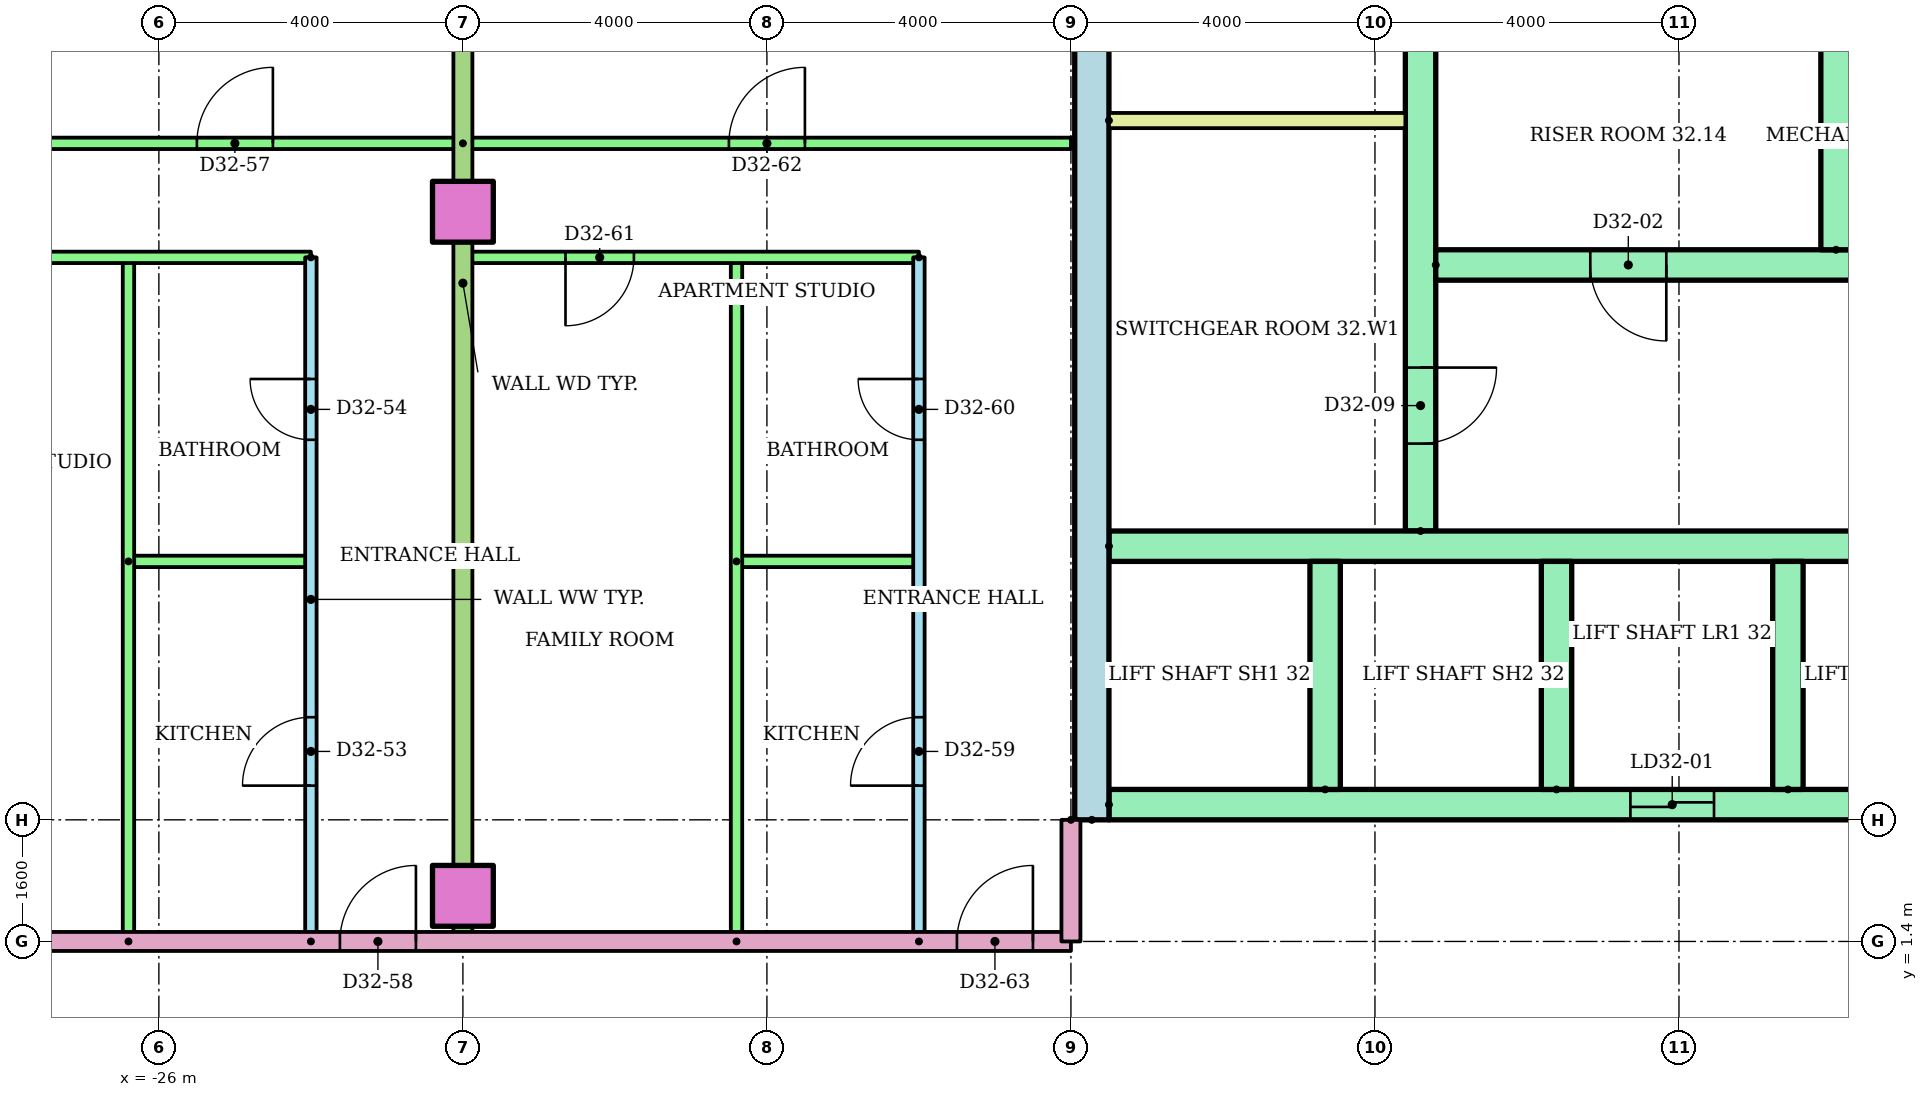
"""IFC4 building model, lengths in metres.
Left out: names, types, materials, properties, quantities, classifications, styles, units other than length and angle.
Written with IfcOpenShell. Run it as: python <this file> out.ifc"""

import sys

from ifc_helpers import new_model, si_unit, direction, frame, frame_2d, origin, origin_2d, place, context, subcontext, project, spatial, rectangle, extrude, element, fill, save


model = new_model("IFC4")
c1 = context("Model", 3, precision=1e-05, world=origin(), true_north=direction((0.0, 1.0)))
c2 = subcontext(c1, "Body", "Model", "MODEL_VIEW")
j1 = project(units=[si_unit("LENGTHUNIT", "METRE"), si_unit("PLANEANGLEUNIT", "RADIAN")], contexts=[c1])
p1 = place(None, origin())
s1 = spatial("IfcSite", under=j1, at=p1, CompositionType="ELEMENT")
p2 = place(p1, origin())
s2 = spatial("IfcBuilding", under=s1, at=p2, CompositionType="ELEMENT")
p3 = place(p2, frame((0.0, 0.0, 126.2)))
s3 = spatial("IfcBuildingStorey", under=s2, at=p3, CompositionType="ELEMENT", Elevation=126.2)
for number, where in (
    (1, (-22.0, 2.0, 0.0)),
    (2, (-22.0, 11.0, 0.0)),
):
    element("IfcColumn", number, at=place(p3, frame(where)), inside=s3, PredefinedType="COLUMN", context=c2, shape_type="SweptSolid", body=[
        extrude(rectangle(XDim=0.8, YDim=0.8, at=origin_2d()), origin(), (0.0, 0.0, 1.0), 3.2),
    ])
p4 = place(p3, frame((-13.725, 3.0, 0.0), z_axis=(0.0, 0.0, 1.0), x_axis=(0.0, 1.0, 0.0)))
e3 = element("IfcWall", 3, at=p4, inside=s3, PredefinedType="SHEAR", context=c2, shape_type="SweptSolid", body=[
    extrude(rectangle(XDim=17.0, YDim=0.45, at=frame_2d((8.5, 0.0))), origin(), (0.0, 0.0, 1.0), 2.92),
])
p5 = place(p3, frame((-9.4, 6.8, 0.0), z_axis=(0.0, 0.0, 1.0), x_axis=(0.0, 1.0, 0.0)))
e4 = element("IfcWall", 4, at=p5, inside=s3, PredefinedType="SHEAR", context=c2, shape_type="SweptSolid", body=[
    extrude(rectangle(XDim=12.7, YDim=0.4, at=frame_2d((6.35, 0.0))), origin(), (0.0, 0.0, 1.0), 2.92),
])
p6 = place(p5, frame((1.15, 0.0, 0.0)))
e5 = element("IfcOpeningElement", 5, at=p6, cuts=e4, PredefinedType="OPENING", context=c2, shape_type="SweptSolid", body=[
    extrude(rectangle(XDim=1.0, YDim=2.1, at=frame_2d((0.5, 1.05))), frame((0.0, 0.21, 0.0), z_axis=(0.0, -1.0, 0.0), x_axis=(1.0, 0.0, 0.0)), (0.0, 0.0, 1.0), 0.42),
])
p7 = place(p5, frame((7.925, 0.0, 0.0)))
e6 = element("IfcOpeningElement", 6, at=p7, cuts=e4, PredefinedType="OPENING", context=c2, shape_type="SweptSolid", body=[
    extrude(rectangle(XDim=1.0, YDim=2.1, at=frame_2d((0.5, 1.05))), frame((0.0, 0.21, 0.0), z_axis=(0.0, -1.0, 0.0), x_axis=(1.0, 0.0, 0.0)), (0.0, 0.0, 1.0), 0.42),
])
p8 = place(p3, frame((-13.5, 3.2, 0.0)))
e7 = element("IfcWall", 7, at=p8, inside=s3, PredefinedType="SHEAR", context=c2, shape_type="SweptSolid", body=[
    extrude(rectangle(XDim=27.0, YDim=0.4, at=frame_2d((13.5, 0.0))), origin(), (0.0, 0.0, 1.0), 2.92),
])
p9 = place(p8, frame((6.861, 0.0, 0.0)))
e8 = element("IfcOpeningElement", 8, at=p9, cuts=e7, PredefinedType="OPENING", context=c2, shape_type="SweptSolid", body=[
    extrude(rectangle(XDim=1.1, YDim=2.1, at=frame_2d((0.55, 1.05))), frame((0.0, 0.21, 0.0), z_axis=(0.0, -1.0, 0.0), x_axis=(1.0, 0.0, 0.0)), (0.0, 0.0, 1.0), 0.42),
])
p10 = place(p8, frame((9.906, 0.0, 0.0)))
e9 = element("IfcOpeningElement", 9, at=p10, cuts=e7, PredefinedType="OPENING", context=c2, shape_type="SweptSolid", body=[
    extrude(rectangle(XDim=1.1, YDim=2.1, at=frame_2d((0.55, 1.05))), frame((0.0, 0.21, 0.0), z_axis=(0.0, -1.0, 0.0), x_axis=(1.0, 0.0, 0.0)), (0.0, 0.0, 1.0), 0.42),
])
p11 = place(p8, frame((15.994, 0.0, 0.0)))
e10 = element("IfcOpeningElement", 10, at=p11, cuts=e7, PredefinedType="OPENING", context=c2, shape_type="SweptSolid", body=[
    extrude(rectangle(XDim=1.1, YDim=2.1, at=frame_2d((0.55, 1.05))), frame((0.0, 0.21, 0.0), z_axis=(0.0, -1.0, 0.0), x_axis=(1.0, 0.0, 0.0)), (0.0, 0.0, 1.0), 0.42),
])
p12 = place(p8, frame((19.039, 0.0, 0.0)))
e11 = element("IfcOpeningElement", 11, at=p12, cuts=e7, PredefinedType="OPENING", context=c2, shape_type="SweptSolid", body=[
    extrude(rectangle(XDim=1.1, YDim=2.1, at=frame_2d((0.55, 1.05))), frame((0.0, 0.21, 0.0), z_axis=(0.0, -1.0, 0.0), x_axis=(1.0, 0.0, 0.0)), (0.0, 0.0, 1.0), 0.42),
])
p13 = place(p8, frame((12.6, 0.0, 0.0)))
e12 = element("IfcOpeningElement", 12, at=p13, cuts=e7, PredefinedType="OPENING", context=c2, shape_type="SweptSolid", body=[
    extrude(rectangle(XDim=1.8, YDim=2.1, at=frame_2d((0.9, 1.05))), frame((0.0, 0.21, 0.0), z_axis=(0.0, -1.0, 0.0), x_axis=(1.0, 0.0, 0.0)), (0.0, 0.0, 1.0), 0.42),
])
p14 = place(p3, frame((-13.5, 6.6, 0.0)))
e13 = element("IfcWall", 13, at=p14, inside=s3, PredefinedType="SHEAR", context=c2, shape_type="SweptSolid", body=[
    extrude(rectangle(XDim=11.978, YDim=0.4, at=frame_2d((5.989, 0.0))), origin(), (0.0, 0.0, 1.0), 2.92),
])
for number, where, z_axis, x_axis in (
    (14, (-10.656, 3.4, 0.0), (0.0, 0.0, 1.0), (0.0, 1.0, 0.0)),
    (15, (-7.611, 3.4, 0.0), (0.0, 0.0, 1.0), (0.0, 1.0, 0.0)),
    (16, (-4.567, 3.4, 0.0), (0.0, 0.0, 1.0), (0.0, 1.0, 0.0)),
):
    element("IfcWall", number, at=place(p3, frame(where, z_axis=z_axis, x_axis=x_axis)), inside=s3, PredefinedType="SHEAR", context=c2, shape_type="SweptSolid", body=[
        extrude(rectangle(XDim=3.0, YDim=0.4, at=frame_2d((1.5, 0.0))), origin(), (0.0, 0.0, 1.0), 2.92),
    ])
p15 = place(p3, frame((-9.2, 10.3, 0.0)))
e17 = element("IfcWall", 17, at=p15, inside=s3, PredefinedType="SHEAR", context=c2, shape_type="SweptSolid", body=[
    extrude(rectangle(XDim=8.0, YDim=0.4, at=frame_2d((4.0, 0.0))), origin(), (0.0, 0.0, 1.0), 2.92),
])
p16 = place(p15, frame((2.033, 0.0, 0.0)))
e18 = element("IfcOpeningElement", 18, at=p16, cuts=e17, PredefinedType="OPENING", context=c2, shape_type="SweptSolid", body=[
    extrude(rectangle(XDim=1.0, YDim=2.1, at=frame_2d((0.5, 1.05))), frame((0.0, 0.21, 0.0), z_axis=(0.0, -1.0, 0.0), x_axis=(1.0, 0.0, 0.0)), (0.0, 0.0, 1.0), 0.42),
])
p17 = place(p15, frame((6.133, 0.0, 0.0)))
e19 = element("IfcOpeningElement", 19, at=p17, cuts=e17, PredefinedType="OPENING", context=c2, shape_type="SweptSolid", body=[
    extrude(rectangle(XDim=1.0, YDim=2.1, at=frame_2d((0.5, 1.05))), frame((0.0, 0.21, 0.0), z_axis=(0.0, -1.0, 0.0), x_axis=(1.0, 0.0, 0.0)), (0.0, 0.0, 1.0), 0.42),
])
p18 = place(p3, frame((-3.933, 10.5, 0.0), z_axis=(0.0, 0.0, 1.0), x_axis=(0.0, 1.0, 0.0)))
e20 = element("IfcWall", 20, at=p18, inside=s3, PredefinedType="SHEAR", context=c2, shape_type="SweptSolid", body=[
    extrude(rectangle(XDim=3.0, YDim=0.4, at=frame_2d((1.5, 0.0))), origin(), (0.0, 0.0, 1.0), 2.92),
])
p19 = place(p3, frame((-13.5, 12.2, 0.0)))
e21 = element("IfcWall", 21, at=p19, inside=s3, PredefinedType="PARTITIONING", context=c2, shape_type="SweptSolid", body=[
    extrude(rectangle(XDim=3.9, YDim=0.2, at=frame_2d((1.95, 0.0))), origin(), (0.0, 0.0, 1.0), 2.92),
])
p20 = place(p3, frame((-24.0, 1.4, 0.0), z_axis=(0.0, 0.0, 1.0), x_axis=(0.0, 1.0, 0.0)))
e22 = element("IfcWall", 22, at=p20, inside=s3, PredefinedType="PARTITIONING", context=c2, shape_type="SweptSolid", body=[
    extrude(rectangle(XDim=9.0, YDim=0.15, at=frame_2d((4.5, 0.0))), origin(), (0.0, 0.0, 1.0), 2.4),
])
p21 = place(p20, frame((2.05, 0.0, 0.0)))
e23 = element("IfcOpeningElement", 23, at=p21, cuts=e22, PredefinedType="OPENING", context=c2, shape_type="SweptSolid", body=[
    extrude(rectangle(XDim=0.9, YDim=2.1, at=frame_2d((0.45, 1.05))), frame((0.0, 0.085, 0.0), z_axis=(0.0, -1.0, 0.0), x_axis=(1.0, 0.0, 0.0)), (0.0, 0.0, 1.0), 0.17),
])
p22 = place(p20, frame((6.6, 0.0, 0.0)))
e24 = element("IfcOpeningElement", 24, at=p22, cuts=e22, PredefinedType="OPENING", context=c2, shape_type="SweptSolid", body=[
    extrude(rectangle(XDim=0.8, YDim=2.1, at=frame_2d((0.4, 1.05))), frame((0.0, 0.085, 0.0), z_axis=(0.0, -1.0, 0.0), x_axis=(1.0, 0.0, 0.0)), (0.0, 0.0, 1.0), 0.17),
])
p23 = place(p3, frame((-26.4, 6.4, 0.0)))
e25 = element("IfcWall", 25, at=p23, inside=s3, PredefinedType="PARTITIONING", context=c2, shape_type="SweptSolid", body=[
    extrude(rectangle(XDim=2.4, YDim=0.15, at=frame_2d((1.2, 0.0))), origin(), (0.0, 0.0, 1.0), 2.4),
])
p24 = place(p3, frame((-26.4, 1.4, 0.0), z_axis=(0.0, 0.0, 1.0), x_axis=(0.0, 1.0, 0.0)))
e26 = element("IfcWall", 26, at=p24, inside=s3, PredefinedType="PARTITIONING", context=c2, shape_type="SweptSolid", body=[
    extrude(rectangle(XDim=9.0, YDim=0.15, at=frame_2d((4.5, 0.0))), origin(), (0.0, 0.0, 1.0), 2.4),
])
p25 = place(p3, frame((-24.0, 10.4, 0.0), z_axis=(0.0, 0.0, 1.0), x_axis=(-1.0, 0.0, 0.0)))
e27 = element("IfcWall", 27, at=p25, inside=s3, PredefinedType="PARTITIONING", context=c2, shape_type="SweptSolid", body=[
    extrude(rectangle(XDim=8.72, YDim=0.15, at=frame_2d((4.36, 0.0))), origin(), (0.0, 0.0, 1.0), 2.4),
])
p26 = place(p25, frame((4.482, 0.0, 0.0)))
e28 = element("IfcOpeningElement", 28, at=p26, cuts=e27, PredefinedType="OPENING", context=c2, shape_type="SweptSolid", body=[
    extrude(rectangle(XDim=0.9, YDim=2.1, at=frame_2d((0.45, 1.05))), frame((0.0, 0.085, 0.0), z_axis=(0.0, -1.0, 0.0), x_axis=(1.0, 0.0, 0.0)), (0.0, 0.0, 1.0), 0.17),
])
p27 = place(p3, frame((-32.72, 11.9, 0.0)))
e29 = element("IfcWall", 29, at=p27, inside=s3, PredefinedType="PARTITIONING", context=c2, shape_type="SweptSolid", body=[
    extrude(rectangle(XDim=10.72, YDim=0.15, at=frame_2d((5.36, 0.0))), origin(), (0.0, 0.0, 1.0), 2.4),
])
p28 = place(p27, frame((1.102, 0.0, 0.0)))
e30 = element("IfcOpeningElement", 30, at=p28, cuts=e29, PredefinedType="OPENING", context=c2, shape_type="SweptSolid", body=[
    extrude(rectangle(XDim=1.0, YDim=2.1, at=frame_2d((0.5, 1.05))), frame((0.0, 0.085, 0.0), z_axis=(0.0, -1.0, 0.0), x_axis=(1.0, 0.0, 0.0)), (0.0, 0.0, 1.0), 0.17),
])
p29 = place(p27, frame((7.22, 0.0, 0.0)))
e31 = element("IfcOpeningElement", 31, at=p29, cuts=e29, PredefinedType="OPENING", context=c2, shape_type="SweptSolid", body=[
    extrude(rectangle(XDim=1.0, YDim=2.1, at=frame_2d((0.5, 1.05))), frame((0.0, 0.085, 0.0), z_axis=(0.0, -1.0, 0.0), x_axis=(1.0, 0.0, 0.0)), (0.0, 0.0, 1.0), 0.17),
])
p30 = place(p3, frame((-16.0, 1.4, 0.0), z_axis=(0.0, 0.0, 1.0), x_axis=(0.0, 1.0, 0.0)))
e32 = element("IfcWall", 32, at=p30, inside=s3, PredefinedType="PARTITIONING", context=c2, shape_type="SweptSolid", body=[
    extrude(rectangle(XDim=9.0, YDim=0.15, at=frame_2d((4.5, 0.0))), origin(), (0.0, 0.0, 1.0), 2.4),
])
p31 = place(p30, frame((2.05, 0.0, 0.0)))
e33 = element("IfcOpeningElement", 33, at=p31, cuts=e32, PredefinedType="OPENING", context=c2, shape_type="SweptSolid", body=[
    extrude(rectangle(XDim=0.9, YDim=2.1, at=frame_2d((0.45, 1.05))), frame((0.0, 0.085, 0.0), z_axis=(0.0, -1.0, 0.0), x_axis=(1.0, 0.0, 0.0)), (0.0, 0.0, 1.0), 0.17),
])
p32 = place(p30, frame((6.6, 0.0, 0.0)))
e34 = element("IfcOpeningElement", 34, at=p32, cuts=e32, PredefinedType="OPENING", context=c2, shape_type="SweptSolid", body=[
    extrude(rectangle(XDim=0.8, YDim=2.1, at=frame_2d((0.4, 1.05))), frame((0.0, 0.085, 0.0), z_axis=(0.0, -1.0, 0.0), x_axis=(1.0, 0.0, 0.0)), (0.0, 0.0, 1.0), 0.17),
])
p33 = place(p3, frame((-18.4, 6.4, 0.0)))
e35 = element("IfcWall", 35, at=p33, inside=s3, PredefinedType="PARTITIONING", context=c2, shape_type="SweptSolid", body=[
    extrude(rectangle(XDim=2.4, YDim=0.15, at=frame_2d((1.2, 0.0))), origin(), (0.0, 0.0, 1.0), 2.4),
])
p34 = place(p3, frame((-18.4, 1.4, 0.0), z_axis=(0.0, 0.0, 1.0), x_axis=(0.0, 1.0, 0.0)))
e36 = element("IfcWall", 36, at=p34, inside=s3, PredefinedType="PARTITIONING", context=c2, shape_type="SweptSolid", body=[
    extrude(rectangle(XDim=9.0, YDim=0.15, at=frame_2d((4.5, 0.0))), origin(), (0.0, 0.0, 1.0), 2.4),
])
p35 = place(p3, frame((-16.0, 10.4, 0.0), z_axis=(0.0, 0.0, 1.0), x_axis=(-1.0, 0.0, 0.0)))
e37 = element("IfcWall", 37, at=p35, inside=s3, PredefinedType="PARTITIONING", context=c2, shape_type="SweptSolid", body=[
    extrude(rectangle(XDim=6.0, YDim=0.15, at=frame_2d((3.0, 0.0))), origin(), (0.0, 0.0, 1.0), 2.4),
])
p36 = place(p35, frame((3.75, 0.0, 0.0)))
e38 = element("IfcOpeningElement", 38, at=p36, cuts=e37, PredefinedType="OPENING", context=c2, shape_type="SweptSolid", body=[
    extrude(rectangle(XDim=0.9, YDim=2.1, at=frame_2d((0.45, 1.05))), frame((0.0, 0.085, 0.0), z_axis=(0.0, -1.0, 0.0), x_axis=(1.0, 0.0, 0.0)), (0.0, 0.0, 1.0), 0.17),
])
p37 = place(p3, frame((-22.0, 11.9, 0.0)))
e39 = element("IfcWall", 39, at=p37, inside=s3, PredefinedType="PARTITIONING", context=c2, shape_type="SweptSolid", body=[
    extrude(rectangle(XDim=8.0, YDim=0.15, at=frame_2d((4.0, 0.0))), origin(), (0.0, 0.0, 1.0), 2.4),
])
p38 = place(p37, frame((3.5, 0.0, 0.0)))
e40 = element("IfcOpeningElement", 40, at=p38, cuts=e39, PredefinedType="OPENING", context=c2, shape_type="SweptSolid", body=[
    extrude(rectangle(XDim=1.0, YDim=2.1, at=frame_2d((0.5, 1.05))), frame((0.0, 0.085, 0.0), z_axis=(0.0, -1.0, 0.0), x_axis=(1.0, 0.0, 0.0)), (0.0, 0.0, 1.0), 0.17),
])
p39 = place(p3, frame((-22.0, 18.721, 0.0), z_axis=(0.0, 0.0, 1.0), x_axis=(0.0, -1.0, 0.0)))
e41 = element("IfcWall", 41, at=p39, inside=s3, PredefinedType="PARTITIONING", context=c2, shape_type="SweptSolid", body=[
    extrude(rectangle(XDim=17.321, YDim=0.25, at=frame_2d((8.661, 0.0))), origin(), (0.0, 0.0, 1.0), 2.4),
])
p40 = place(p3, frame((-29.0, 1.4, 0.0)))
e42 = element("IfcWall", 42, at=p40, inside=s3, PredefinedType="PARTITIONING", context=c2, shape_type="SweptSolid", body=[
    extrude(rectangle(XDim=15.0, YDim=0.25, at=frame_2d((7.5, 0.0))), origin(), (0.0, 0.0, 1.0), 2.4),
])
p41 = place(p40, frame((5.382, 0.0, 0.0)))
e43 = element("IfcOpeningElement", 43, at=p41, cuts=e42, PredefinedType="OPENING", context=c2, shape_type="SweptSolid", body=[
    extrude(rectangle(XDim=1.0, YDim=2.1, at=frame_2d((0.5, 1.05))), frame((0.0, 0.135, 0.0), z_axis=(0.0, -1.0, 0.0), x_axis=(1.0, 0.0, 0.0)), (0.0, 0.0, 1.0), 0.27),
])
p42 = place(p40, frame((13.5, 0.0, 0.0)))
e44 = element("IfcOpeningElement", 44, at=p42, cuts=e42, PredefinedType="OPENING", context=c2, shape_type="SweptSolid", body=[
    extrude(rectangle(XDim=1.0, YDim=2.1, at=frame_2d((0.5, 1.05))), frame((0.0, 0.135, 0.0), z_axis=(0.0, -1.0, 0.0), x_axis=(1.0, 0.0, 0.0)), (0.0, 0.0, 1.0), 0.27),
])
p43 = place(p3, frame((-14.0, 3.0, 0.0), z_axis=(0.0, 0.0, 1.0), x_axis=(0.0, -1.0, 0.0)))
e45 = element("IfcWall", 45, at=p43, inside=s3, PredefinedType="PARTITIONING", context=c2, shape_type="SweptSolid", body=[
    extrude(rectangle(XDim=1.6, YDim=0.25, at=frame_2d((0.8, 0.0))), origin(), (0.0, 0.0, 1.0), 2.4),
])
p44 = place(p9, origin())
e46 = element("IfcDoor", 46, at=p44, inside=s3, OperationType="SLIDING_TO_LEFT", PredefinedType="DOOR", context=c2, shape_type="SweptSolid", body=[
    extrude(rectangle(XDim=1.1, YDim=2.1, at=frame_2d((0.55, 1.05))), frame((0.0, 0.025, 0.0), z_axis=(0.0, -1.0, 0.0), x_axis=(1.0, 0.0, 0.0)), (0.0, 0.0, 1.0), 0.05),
])
fill(e8, e46)
p45 = place(p16, frame((1.0, 0.0, 0.0), z_axis=(0.0, 0.0, 1.0), x_axis=(-1.0, 0.0, 0.0)))
e47 = element("IfcDoor", 47, at=p45, inside=s3, OperationType="SINGLE_SWING_RIGHT", PredefinedType="DOOR", context=c2, shape_type="SweptSolid", body=[
    extrude(rectangle(XDim=1.0, YDim=2.1, at=frame_2d((0.5, 1.05))), frame((0.0, 0.025, 0.0), z_axis=(0.0, -1.0, 0.0), x_axis=(1.0, 0.0, 0.0)), (0.0, 0.0, 1.0), 0.05),
])
fill(e18, e47)
p46 = place(p6, frame((1.0, 0.0, 0.0), z_axis=(0.0, 0.0, 1.0), x_axis=(-1.0, 0.0, 0.0)))
e48 = element("IfcDoor", 48, at=p46, inside=s3, OperationType="SINGLE_SWING_RIGHT", PredefinedType="DOOR", context=c2, shape_type="SweptSolid", body=[
    extrude(rectangle(XDim=1.0, YDim=2.1, at=frame_2d((0.5, 1.05))), frame((0.0, 0.025, 0.0), z_axis=(0.0, -1.0, 0.0), x_axis=(1.0, 0.0, 0.0)), (0.0, 0.0, 1.0), 0.05),
])
fill(e5, e48)
p47 = place(p21, origin())
e49 = element("IfcDoor", 49, at=p47, inside=s3, OperationType="SINGLE_SWING_LEFT", PredefinedType="DOOR", context=c2, shape_type="SweptSolid", body=[
    extrude(rectangle(XDim=0.9, YDim=2.1, at=frame_2d((0.45, 1.05))), frame((0.0, 0.025, 0.0), z_axis=(0.0, -1.0, 0.0), x_axis=(1.0, 0.0, 0.0)), (0.0, 0.0, 1.0), 0.05),
])
fill(e23, e49)
p48 = place(p22, origin())
e50 = element("IfcDoor", 50, at=p48, inside=s3, OperationType="SINGLE_SWING_RIGHT", PredefinedType="DOOR", context=c2, shape_type="SweptSolid", body=[
    extrude(rectangle(XDim=0.8, YDim=2.1, at=frame_2d((0.4, 1.05))), frame((0.0, 0.025, 0.0), z_axis=(0.0, -1.0, 0.0), x_axis=(1.0, 0.0, 0.0)), (0.0, 0.0, 1.0), 0.05),
])
fill(e24, e50)
p49 = place(p29, origin())
e51 = element("IfcDoor", 51, at=p49, inside=s3, OperationType="SINGLE_SWING_RIGHT", PredefinedType="DOOR", context=c2, shape_type="SweptSolid", body=[
    extrude(rectangle(XDim=1.0, YDim=2.1, at=frame_2d((0.5, 1.05))), frame((0.0, 0.025, 0.0), z_axis=(0.0, -1.0, 0.0), x_axis=(1.0, 0.0, 0.0)), (0.0, 0.0, 1.0), 0.05),
])
fill(e31, e51)
p50 = place(p41, origin())
e52 = element("IfcDoor", 52, at=p50, inside=s3, OperationType="SINGLE_SWING_RIGHT", PredefinedType="DOOR", context=c2, shape_type="SweptSolid", body=[
    extrude(rectangle(XDim=1.0, YDim=2.1, at=frame_2d((0.5, 1.05))), frame((0.0, 0.025, 0.0), z_axis=(0.0, -1.0, 0.0), x_axis=(1.0, 0.0, 0.0)), (0.0, 0.0, 1.0), 0.05),
])
fill(e43, e52)
p51 = place(p31, origin())
e53 = element("IfcDoor", 53, at=p51, inside=s3, OperationType="SINGLE_SWING_LEFT", PredefinedType="DOOR", context=c2, shape_type="SweptSolid", body=[
    extrude(rectangle(XDim=0.9, YDim=2.1, at=frame_2d((0.45, 1.05))), frame((0.0, 0.025, 0.0), z_axis=(0.0, -1.0, 0.0), x_axis=(1.0, 0.0, 0.0)), (0.0, 0.0, 1.0), 0.05),
])
fill(e33, e53)
p52 = place(p32, origin())
e54 = element("IfcDoor", 54, at=p52, inside=s3, OperationType="SINGLE_SWING_RIGHT", PredefinedType="DOOR", context=c2, shape_type="SweptSolid", body=[
    extrude(rectangle(XDim=0.8, YDim=2.1, at=frame_2d((0.4, 1.05))), frame((0.0, 0.025, 0.0), z_axis=(0.0, -1.0, 0.0), x_axis=(1.0, 0.0, 0.0)), (0.0, 0.0, 1.0), 0.05),
])
fill(e34, e54)
p53 = place(p36, origin())
e55 = element("IfcDoor", 55, at=p53, inside=s3, OperationType="SINGLE_SWING_RIGHT", PredefinedType="DOOR", context=c2, shape_type="SweptSolid", body=[
    extrude(rectangle(XDim=0.9, YDim=2.1, at=frame_2d((0.45, 1.05))), frame((0.0, 0.025, 0.0), z_axis=(0.0, -1.0, 0.0), x_axis=(1.0, 0.0, 0.0)), (0.0, 0.0, 1.0), 0.05),
])
fill(e38, e55)
p54 = place(p38, origin())
e56 = element("IfcDoor", 56, at=p54, inside=s3, OperationType="SINGLE_SWING_RIGHT", PredefinedType="DOOR", context=c2, shape_type="SweptSolid", body=[
    extrude(rectangle(XDim=1.0, YDim=2.1, at=frame_2d((0.5, 1.05))), frame((0.0, 0.025, 0.0), z_axis=(0.0, -1.0, 0.0), x_axis=(1.0, 0.0, 0.0)), (0.0, 0.0, 1.0), 0.05),
])
fill(e40, e56)
p55 = place(p42, origin())
e57 = element("IfcDoor", 57, at=p55, inside=s3, OperationType="SINGLE_SWING_RIGHT", PredefinedType="DOOR", context=c2, shape_type="SweptSolid", body=[
    extrude(rectangle(XDim=1.0, YDim=2.1, at=frame_2d((0.5, 1.05))), frame((0.0, 0.025, 0.0), z_axis=(0.0, -1.0, 0.0), x_axis=(1.0, 0.0, 0.0)), (0.0, 0.0, 1.0), 0.05),
])
fill(e44, e57)
save(model, sys.argv[1])
